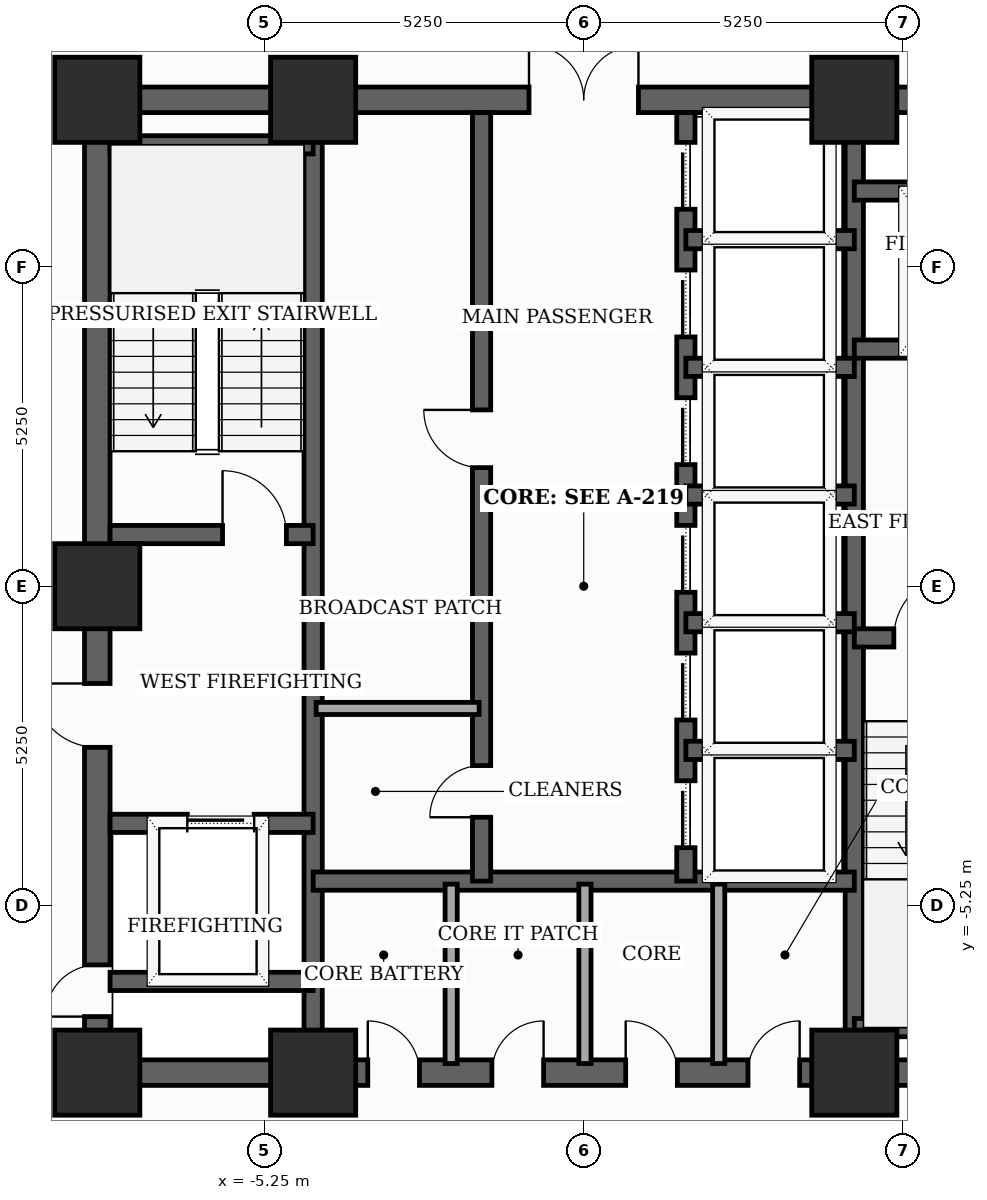
"""IFC4 building model, lengths in metres.
Left out: names, types, materials, properties, quantities, classifications, styles, units other than length and angle.
Written with IfcOpenShell. Run it as: python <this file> out.ifc"""

import sys

from ifc_helpers import new_model, si_unit, direction, frame, frame_2d, origin, origin_2d, place, context, subcontext, project, spatial, rectangle, extrude, element, fill, save


model = new_model("IFC4")
c1 = context("Model", 3, precision=1e-05, world=origin(), true_north=direction((0.0, 1.0)))
c2 = subcontext(c1, "Body", "Model", "MODEL_VIEW")
j1 = project(units=[si_unit("LENGTHUNIT", "METRE"), si_unit("PLANEANGLEUNIT", "RADIAN")], contexts=[c1])
p1 = place(None, origin())
s1 = spatial("IfcSite", under=j1, at=p1, CompositionType="ELEMENT")
p2 = place(p1, origin())
s2 = spatial("IfcBuilding", under=s1, at=p2, CompositionType="ELEMENT")
p3 = place(p2, frame((0.0, 0.0, 180.5)))
s3 = spatial("IfcBuildingStorey", under=s2, at=p3, CompositionType="ELEMENT", Elevation=180.5)
for number, where, z_axis, x_axis in (
    (1, (-8.0, -8.0, 0.0), (0.0, 0.0, 1.0), (1.0, 0.0, 0.0)),
    (2, (-4.45, -8.0, 0.0), (0.0, 0.0, 1.0), (1.0, 0.0, 0.0)),
    (3, (4.45, -8.0, 0.0), (0.0, 0.0, 1.0), (1.0, 0.0, 0.0)),
    (4, (4.45, 8.0, 0.0), (0.0, 0.0, 1.0), (1.0, 0.0, 0.0)),
    (5, (-4.45, 8.0, 0.0), (0.0, 0.0, 1.0), (1.0, 0.0, 0.0)),
    (6, (-8.0, 8.0, 0.0), (0.0, 0.0, 1.0), (1.0, 0.0, 0.0)),
    (7, (-8.0, 0.0, 0.0), (0.0, 0.0, 1.0), (1.0, 0.0, 0.0)),
):
    element("IfcColumn", number, at=place(p3, frame(where, z_axis=z_axis, x_axis=x_axis)), inside=s3, PredefinedType="COLUMN", context=c2, shape_type="SweptSolid", body=[
        extrude(rectangle(XDim=1.4, YDim=1.4, at=origin_2d()), origin(), (0.0, 0.0, 1.0), 3.7),
    ])
p4 = place(p3, frame((-8.0, -8.0, 0.0), z_axis=(0.0, 0.0, 1.0), x_axis=(0.0, 1.0, 0.0)))
e8 = element("IfcWall", 8, at=p4, inside=s3, PredefinedType="SHEAR", context=c2, shape_type="SweptSolid", body=[
    extrude(rectangle(XDim=16.0, YDim=0.42, at=frame_2d((8.0, 0.0))), origin(), (0.0, 0.0, 1.0), 3.5),
])
p5 = place(p4, frame((0.922, 0.0, 0.0)))
e9 = element("IfcOpeningElement", 9, at=p5, cuts=e8, PredefinedType="OPENING", context=c2, shape_type="SweptSolid", body=[
    extrude(rectangle(XDim=0.85, YDim=2.02, at=frame_2d((0.425, 1.01))), frame((0.0, 0.22, 0.0), z_axis=(0.0, -1.0, 0.0), x_axis=(1.0, 0.0, 0.0)), (0.0, 0.0, 1.0), 0.44),
])
p6 = place(p4, frame((5.35, 0.0, 0.0)))
e10 = element("IfcOpeningElement", 10, at=p6, cuts=e8, PredefinedType="OPENING", context=c2, shape_type="SweptSolid", body=[
    extrude(rectangle(XDim=1.05, YDim=2.15, at=frame_2d((0.525, 1.075))), frame((0.0, 0.22, 0.0), z_axis=(0.0, -1.0, 0.0), x_axis=(1.0, 0.0, 0.0)), (0.0, 0.0, 1.0), 0.44),
])
p7 = place(p3, frame((-8.0, -8.0, 0.0), z_axis=(0.0, 0.0, 1.0), x_axis=(1.0, 0.0, 0.0)))
e11 = element("IfcWall", 11, at=p7, inside=s3, PredefinedType="SHEAR", context=c2, shape_type="SweptSolid", body=[
    extrude(rectangle(XDim=16.0, YDim=0.42, at=frame_2d((8.0, 0.0))), origin(), (0.0, 0.0, 1.0), 3.5),
])
p8 = place(p7, frame((4.449, 0.0, 0.0)))
e12 = element("IfcOpeningElement", 12, at=p8, cuts=e11, PredefinedType="OPENING", context=c2, shape_type="SweptSolid", body=[
    extrude(rectangle(XDim=0.85, YDim=2.02, at=frame_2d((0.425, 1.01))), frame((0.0, 0.22, 0.0), z_axis=(0.0, -1.0, 0.0), x_axis=(1.0, 0.0, 0.0)), (0.0, 0.0, 1.0), 0.44),
])
p9 = place(p7, frame((6.49, 0.0, 0.0)))
e13 = element("IfcOpeningElement", 13, at=p9, cuts=e11, PredefinedType="OPENING", context=c2, shape_type="SweptSolid", body=[
    extrude(rectangle(XDim=0.85, YDim=2.02, at=frame_2d((0.425, 1.01))), frame((0.0, 0.22, 0.0), z_axis=(0.0, -1.0, 0.0), x_axis=(1.0, 0.0, 0.0)), (0.0, 0.0, 1.0), 0.44),
])
p10 = place(p7, frame((8.69, 0.0, 0.0)))
e14 = element("IfcOpeningElement", 14, at=p10, cuts=e11, PredefinedType="OPENING", context=c2, shape_type="SweptSolid", body=[
    extrude(rectangle(XDim=0.85, YDim=2.02, at=frame_2d((0.425, 1.01))), frame((0.0, 0.22, 0.0), z_axis=(0.0, -1.0, 0.0), x_axis=(1.0, 0.0, 0.0)), (0.0, 0.0, 1.0), 0.44),
])
p11 = place(p7, frame((10.701, 0.0, 0.0)))
e15 = element("IfcOpeningElement", 15, at=p11, cuts=e11, PredefinedType="OPENING", context=c2, shape_type="SweptSolid", body=[
    extrude(rectangle(XDim=0.85, YDim=2.02, at=frame_2d((0.425, 1.01))), frame((0.0, 0.22, 0.0), z_axis=(0.0, -1.0, 0.0), x_axis=(1.0, 0.0, 0.0)), (0.0, 0.0, 1.0), 0.44),
])
p12 = place(p3, frame((-8.0, 8.0, 0.0), z_axis=(0.0, 0.0, 1.0), x_axis=(1.0, 0.0, 0.0)))
e16 = element("IfcWall", 16, at=p12, inside=s3, PredefinedType="SHEAR", context=c2, shape_type="SweptSolid", body=[
    extrude(rectangle(XDim=16.0, YDim=0.42, at=frame_2d((8.0, 0.0))), origin(), (0.0, 0.0, 1.0), 3.5),
])
p13 = place(p12, frame((7.1, 0.0, 0.0)))
e17 = element("IfcOpeningElement", 17, at=p13, cuts=e16, PredefinedType="OPENING", context=c2, shape_type="SweptSolid", body=[
    extrude(rectangle(XDim=1.8, YDim=2.15, at=frame_2d((0.9, 1.075))), frame((0.0, 0.22, 0.0), z_axis=(0.0, -1.0, 0.0), x_axis=(1.0, 0.0, 0.0)), (0.0, 0.0, 1.0), 0.44),
])
for number, where, z_axis, x_axis in (
    (18, (-4.45, -7.79, 0.0), (0.0, 0.0, 1.0), (0.0, 1.0, 0.0)),
    (19, (4.45, -7.79, 0.0), (0.0, 0.0, 1.0), (0.0, 1.0, 0.0)),
):
    element("IfcWall", number, at=place(p3, frame(where, z_axis=z_axis, x_axis=x_axis)), inside=s3, PredefinedType="SHEAR", context=c2, shape_type="SweptSolid", body=[
        extrude(rectangle(XDim=15.58, YDim=0.3, at=frame_2d((7.79, 0.0))), origin(), (0.0, 0.0, 1.0), 3.5),
    ])
p14 = place(p3, frame((-7.79, 0.85, 0.0), z_axis=(0.0, 0.0, 1.0), x_axis=(1.0, 0.0, 0.0)))
e20 = element("IfcWall", 20, at=p14, inside=s3, PredefinedType="SHEAR", context=c2, shape_type="SweptSolid", body=[
    extrude(rectangle(XDim=3.34, YDim=0.3, at=frame_2d((1.67, 0.0))), origin(), (0.0, 0.0, 1.0), 3.5),
])
p15 = place(p14, frame((1.85, 0.0, 0.0)))
e21 = element("IfcOpeningElement", 21, at=p15, cuts=e20, PredefinedType="OPENING", context=c2, shape_type="SweptSolid", body=[
    extrude(rectangle(XDim=1.05, YDim=2.15, at=frame_2d((0.525, 1.075))), frame((0.0, 0.16, 0.0), z_axis=(0.0, -1.0, 0.0), x_axis=(1.0, 0.0, 0.0)), (0.0, 0.0, 1.0), 0.32),
])
p16 = place(p3, frame((-7.79, 7.26, 0.0), z_axis=(0.0, 0.0, 1.0), x_axis=(1.0, 0.0, 0.0)))
e22 = element("IfcWall", 22, at=p16, inside=s3, PredefinedType="SHEAR", context=c2, shape_type="SweptSolid", body=[
    extrude(rectangle(XDim=3.34, YDim=0.3, at=frame_2d((1.67, 0.0))), origin(), (0.0, 0.0, 1.0), 3.5),
])
p17 = place(p3, frame((4.45, -0.85, 0.0), z_axis=(0.0, 0.0, 1.0), x_axis=(1.0, 0.0, 0.0)))
e23 = element("IfcWall", 23, at=p17, inside=s3, PredefinedType="SHEAR", context=c2, shape_type="SweptSolid", body=[
    extrude(rectangle(XDim=3.34, YDim=0.3, at=frame_2d((1.67, 0.0))), origin(), (0.0, 0.0, 1.0), 3.5),
])
p18 = place(p17, frame((0.65, 0.0, 0.0)))
e24 = element("IfcOpeningElement", 24, at=p18, cuts=e23, PredefinedType="OPENING", context=c2, shape_type="SweptSolid", body=[
    extrude(rectangle(XDim=1.05, YDim=2.15, at=frame_2d((0.525, 1.075))), frame((0.0, 0.16, 0.0), z_axis=(0.0, -1.0, 0.0), x_axis=(1.0, 0.0, 0.0)), (0.0, 0.0, 1.0), 0.32),
])
p19 = place(p3, frame((4.45, -7.26, 0.0), z_axis=(0.0, 0.0, 1.0), x_axis=(1.0, 0.0, 0.0)))
e25 = element("IfcWall", 25, at=p19, inside=s3, PredefinedType="SHEAR", context=c2, shape_type="SweptSolid", body=[
    extrude(rectangle(XDim=3.55, YDim=0.3, at=frame_2d((1.775, 0.0))), origin(), (0.0, 0.0, 1.0), 3.5),
])
p20 = place(p3, frame((-7.79, -3.9, 0.0), z_axis=(0.0, 0.0, 1.0), x_axis=(1.0, 0.0, 0.0)))
e26 = element("IfcWall", 26, at=p20, inside=s3, PredefinedType="SHEAR", context=c2, shape_type="SweptSolid", body=[
    extrude(rectangle(XDim=3.34, YDim=0.3, at=frame_2d((1.67, 0.0))), origin(), (0.0, 0.0, 1.0), 3.5),
])
p21 = place(p20, frame((1.27, 0.0, 0.0)))
e27 = element("IfcOpeningElement", 27, at=p21, cuts=e26, PredefinedType="OPENING", context=c2, shape_type="SweptSolid", body=[
    extrude(rectangle(XDim=1.1, YDim=2.1, at=frame_2d((0.55, 1.05))), frame((0.0, 0.16, 0.0), z_axis=(0.0, -1.0, 0.0), x_axis=(1.0, 0.0, 0.0)), (0.0, 0.0, 1.0), 0.32),
])
p22 = place(p3, frame((-7.79, -6.5, 0.0), z_axis=(0.0, 0.0, 1.0), x_axis=(1.0, 0.0, 0.0)))
e28 = element("IfcWall", 28, at=p22, inside=s3, PredefinedType="SHEAR", context=c2, shape_type="SweptSolid", body=[
    extrude(rectangle(XDim=3.34, YDim=0.3, at=frame_2d((1.67, 0.0))), origin(), (0.0, 0.0, 1.0), 3.5),
])
p23 = place(p3, frame((4.45, 3.9, 0.0), z_axis=(0.0, 0.0, 1.0), x_axis=(1.0, 0.0, 0.0)))
e29 = element("IfcWall", 29, at=p23, inside=s3, PredefinedType="SHEAR", context=c2, shape_type="SweptSolid", body=[
    extrude(rectangle(XDim=3.34, YDim=0.3, at=frame_2d((1.67, 0.0))), origin(), (0.0, 0.0, 1.0), 3.5),
])
p24 = place(p23, frame((1.18, 0.0, 0.0)))
e30 = element("IfcOpeningElement", 30, at=p24, cuts=e29, PredefinedType="OPENING", context=c2, shape_type="SweptSolid", body=[
    extrude(rectangle(XDim=1.1, YDim=2.1, at=frame_2d((0.55, 1.05))), frame((0.0, 0.16, 0.0), z_axis=(0.0, -1.0, 0.0), x_axis=(1.0, 0.0, 0.0)), (0.0, 0.0, 1.0), 0.32),
])
p25 = place(p3, frame((4.45, 6.5, 0.0), z_axis=(0.0, 0.0, 1.0), x_axis=(1.0, 0.0, 0.0)))
e31 = element("IfcWall", 31, at=p25, inside=s3, PredefinedType="SHEAR", context=c2, shape_type="SweptSolid", body=[
    extrude(rectangle(XDim=3.34, YDim=0.3, at=frame_2d((1.67, 0.0))), origin(), (0.0, 0.0, 1.0), 3.5),
])
p26 = place(p3, frame((-4.45, -4.85, 0.0), z_axis=(0.0, 0.0, 1.0), x_axis=(1.0, 0.0, 0.0)))
e32 = element("IfcWall", 32, at=p26, inside=s3, PredefinedType="SHEAR", context=c2, shape_type="SweptSolid", body=[
    extrude(rectangle(XDim=8.9, YDim=0.3, at=frame_2d((4.45, 0.0))), origin(), (0.0, 0.0, 1.0), 3.5),
])
p27 = place(p3, frame((-1.68, -4.85, 0.0), z_axis=(0.0, 0.0, 1.0), x_axis=(0.0, 1.0, 0.0)))
e33 = element("IfcWall", 33, at=p27, inside=s3, PredefinedType="SHEAR", context=c2, shape_type="SweptSolid", body=[
    extrude(rectangle(XDim=12.64, YDim=0.3, at=frame_2d((6.32, 0.0))), origin(), (0.0, 0.0, 1.0), 3.5),
])
p28 = place(p27, frame((1.05, 0.0, 0.0)))
e34 = element("IfcOpeningElement", 34, at=p28, cuts=e33, PredefinedType="OPENING", context=c2, shape_type="SweptSolid", body=[
    extrude(rectangle(XDim=0.85, YDim=2.02, at=frame_2d((0.425, 1.01))), frame((0.0, 0.16, 0.0), z_axis=(0.0, -1.0, 0.0), x_axis=(1.0, 0.0, 0.0)), (0.0, 0.0, 1.0), 0.32),
])
p29 = place(p27, frame((6.8, 0.0, 0.0)))
e35 = element("IfcOpeningElement", 35, at=p29, cuts=e33, PredefinedType="OPENING", context=c2, shape_type="SweptSolid", body=[
    extrude(rectangle(XDim=0.95, YDim=2.1, at=frame_2d((0.475, 1.05))), frame((0.0, 0.16, 0.0), z_axis=(0.0, -1.0, 0.0), x_axis=(1.0, 0.0, 0.0)), (0.0, 0.0, 1.0), 0.32),
])
p30 = place(p3, frame((1.68, -4.85, 0.0), z_axis=(0.0, 0.0, 1.0), x_axis=(0.0, 1.0, 0.0)))
e36 = element("IfcWall", 36, at=p30, inside=s3, PredefinedType="SHEAR", context=c2, shape_type="SweptSolid", body=[
    extrude(rectangle(XDim=12.64, YDim=0.3, at=frame_2d((6.32, 0.0))), origin(), (0.0, 0.0, 1.0), 3.5),
])
p31 = place(p30, frame((0.55, 0.0, 0.0)))
e37 = element("IfcOpeningElement", 37, at=p31, cuts=e36, PredefinedType="OPENING", context=c2, shape_type="SweptSolid", body=[
    extrude(rectangle(XDim=1.1, YDim=2.1, at=frame_2d((0.55, 1.05))), frame((0.0, 0.16, 0.0), z_axis=(0.0, -1.0, 0.0), x_axis=(1.0, 0.0, 0.0)), (0.0, 0.0, 1.0), 0.32),
])
p32 = place(p30, frame((2.65, 0.0, 0.0)))
e38 = element("IfcOpeningElement", 38, at=p32, cuts=e36, PredefinedType="OPENING", context=c2, shape_type="SweptSolid", body=[
    extrude(rectangle(XDim=1.1, YDim=2.1, at=frame_2d((0.55, 1.05))), frame((0.0, 0.16, 0.0), z_axis=(0.0, -1.0, 0.0), x_axis=(1.0, 0.0, 0.0)), (0.0, 0.0, 1.0), 0.32),
])
p33 = place(p30, frame((4.75, 0.0, 0.0)))
e39 = element("IfcOpeningElement", 39, at=p33, cuts=e36, PredefinedType="OPENING", context=c2, shape_type="SweptSolid", body=[
    extrude(rectangle(XDim=1.1, YDim=2.1, at=frame_2d((0.55, 1.05))), frame((0.0, 0.16, 0.0), z_axis=(0.0, -1.0, 0.0), x_axis=(1.0, 0.0, 0.0)), (0.0, 0.0, 1.0), 0.32),
])
p34 = place(p30, frame((6.85, 0.0, 0.0)))
e40 = element("IfcOpeningElement", 40, at=p34, cuts=e36, PredefinedType="OPENING", context=c2, shape_type="SweptSolid", body=[
    extrude(rectangle(XDim=1.1, YDim=2.1, at=frame_2d((0.55, 1.05))), frame((0.0, 0.16, 0.0), z_axis=(0.0, -1.0, 0.0), x_axis=(1.0, 0.0, 0.0)), (0.0, 0.0, 1.0), 0.32),
])
p35 = place(p30, frame((8.95, 0.0, 0.0)))
e41 = element("IfcOpeningElement", 41, at=p35, cuts=e36, PredefinedType="OPENING", context=c2, shape_type="SweptSolid", body=[
    extrude(rectangle(XDim=1.1, YDim=2.1, at=frame_2d((0.55, 1.05))), frame((0.0, 0.16, 0.0), z_axis=(0.0, -1.0, 0.0), x_axis=(1.0, 0.0, 0.0)), (0.0, 0.0, 1.0), 0.32),
])
p36 = place(p30, frame((11.05, 0.0, 0.0)))
e42 = element("IfcOpeningElement", 42, at=p36, cuts=e36, PredefinedType="OPENING", context=c2, shape_type="SweptSolid", body=[
    extrude(rectangle(XDim=1.1, YDim=2.1, at=frame_2d((0.55, 1.05))), frame((0.0, 0.16, 0.0), z_axis=(0.0, -1.0, 0.0), x_axis=(1.0, 0.0, 0.0)), (0.0, 0.0, 1.0), 0.32),
])
for number, where, z_axis, x_axis in (
    (43, (1.68, 1.5, 0.0), (0.0, 0.0, 1.0), (1.0, 0.0, 0.0)),
    (44, (1.68, 3.6, 0.0), (0.0, 0.0, 1.0), (1.0, 0.0, 0.0)),
    (45, (1.68, 5.7, 0.0), (0.0, 0.0, 1.0), (1.0, 0.0, 0.0)),
    (46, (1.68, -2.7, 0.0), (0.0, 0.0, 1.0), (1.0, 0.0, 0.0)),
    (47, (1.68, -0.6, 0.0), (0.0, 0.0, 1.0), (1.0, 0.0, 0.0)),
):
    element("IfcWall", number, at=place(p3, frame(where, z_axis=z_axis, x_axis=x_axis)), inside=s3, PredefinedType="SHEAR", context=c2, shape_type="SweptSolid", body=[
        extrude(rectangle(XDim=2.77, YDim=0.3, at=frame_2d((1.385, 0.0))), origin(), (0.0, 0.0, 1.0), 3.5),
    ])
for number, where, z_axis, x_axis in (
    (48, (-2.18, -7.85, 0.0), (0.0, 0.0, 1.0), (0.0, 1.0, 0.0)),
    (49, (0.02, -7.85, 0.0), (0.0, 0.0, 1.0), (0.0, 1.0, 0.0)),
    (50, (2.22, -7.85, 0.0), (0.0, 0.0, 1.0), (0.0, 1.0, 0.0)),
):
    element("IfcWall", number, at=place(p3, frame(where, z_axis=z_axis, x_axis=x_axis)), inside=s3, PredefinedType="SOLIDWALL", context=c2, shape_type="SweptSolid", body=[
        extrude(rectangle(XDim=2.95, YDim=0.2, at=frame_2d((1.475, 0.0))), origin(), (0.0, 0.0, 1.0), 2.885),
    ])
p37 = place(p3, frame((-4.4, -2.01, 0.0), z_axis=(0.0, 0.0, 1.0), x_axis=(1.0, 0.0, 0.0)))
e51 = element("IfcWall", 51, at=p37, inside=s3, PredefinedType="SOLIDWALL", context=c2, shape_type="SweptSolid", body=[
    extrude(rectangle(XDim=2.68, YDim=0.2, at=frame_2d((1.34, 0.0))), origin(), (0.0, 0.0, 1.0), 3.5),
])
p38 = place(p5, origin())
e52 = element("IfcDoor", 52, at=p38, inside=s3, OperationType="SINGLE_SWING_LEFT", PredefinedType="TRAPDOOR", context=c2, shape_type="SweptSolid", body=[
    extrude(rectangle(XDim=0.85, YDim=2.02, at=frame_2d((0.425, 1.01))), frame((0.0, 0.025, 0.0), z_axis=(0.0, -1.0, 0.0), x_axis=(1.0, 0.0, 0.0)), (0.0, 0.0, 1.0), 0.05),
])
fill(e9, e52)
p39 = place(p6, origin())
e53 = element("IfcDoor", 53, at=p39, inside=s3, OperationType="SINGLE_SWING_RIGHT", PredefinedType="DOOR", context=c2, shape_type="SweptSolid", body=[
    extrude(rectangle(XDim=1.05, YDim=2.15, at=frame_2d((0.525, 1.075))), frame((0.0, 0.025, 0.0), z_axis=(0.0, -1.0, 0.0), x_axis=(1.0, 0.0, 0.0)), (0.0, 0.0, 1.0), 0.05),
])
fill(e10, e53)
p40 = place(p8, origin())
e54 = element("IfcDoor", 54, at=p40, inside=s3, OperationType="SINGLE_SWING_LEFT", PredefinedType="TRAPDOOR", context=c2, shape_type="SweptSolid", body=[
    extrude(rectangle(XDim=0.85, YDim=2.02, at=frame_2d((0.425, 1.01))), frame((0.0, 0.025, 0.0), z_axis=(0.0, -1.0, 0.0), x_axis=(1.0, 0.0, 0.0)), (0.0, 0.0, 1.0), 0.05),
])
fill(e12, e54)
p41 = place(p9, origin())
e55 = element("IfcDoor", 55, at=p41, inside=s3, OperationType="SINGLE_SWING_RIGHT", PredefinedType="TRAPDOOR", context=c2, shape_type="SweptSolid", body=[
    extrude(rectangle(XDim=0.85, YDim=2.02, at=frame_2d((0.425, 1.01))), frame((0.0, 0.025, 0.0), z_axis=(0.0, -1.0, 0.0), x_axis=(1.0, 0.0, 0.0)), (0.0, 0.0, 1.0), 0.05),
])
fill(e13, e55)
p42 = place(p10, origin())
e56 = element("IfcDoor", 56, at=p42, inside=s3, OperationType="SINGLE_SWING_LEFT", PredefinedType="TRAPDOOR", context=c2, shape_type="SweptSolid", body=[
    extrude(rectangle(XDim=0.85, YDim=2.02, at=frame_2d((0.425, 1.01))), frame((0.0, 0.025, 0.0), z_axis=(0.0, -1.0, 0.0), x_axis=(1.0, 0.0, 0.0)), (0.0, 0.0, 1.0), 0.05),
])
fill(e14, e56)
p43 = place(p11, origin())
e57 = element("IfcDoor", 57, at=p43, inside=s3, OperationType="SINGLE_SWING_RIGHT", PredefinedType="TRAPDOOR", context=c2, shape_type="SweptSolid", body=[
    extrude(rectangle(XDim=0.85, YDim=2.02, at=frame_2d((0.425, 1.01))), frame((0.0, 0.025, 0.0), z_axis=(0.0, -1.0, 0.0), x_axis=(1.0, 0.0, 0.0)), (0.0, 0.0, 1.0), 0.05),
])
fill(e15, e57)
p44 = place(p13, origin())
e58 = element("IfcDoor", 58, at=p44, inside=s3, OperationType="DOUBLE_DOOR_SINGLE_SWING", PredefinedType="DOOR", context=c2, shape_type="SweptSolid", body=[
    extrude(rectangle(XDim=1.8, YDim=2.15, at=frame_2d((0.9, 1.075))), frame((0.0, 0.025, 0.0), z_axis=(0.0, -1.0, 0.0), x_axis=(1.0, 0.0, 0.0)), (0.0, 0.0, 1.0), 0.05),
])
fill(e17, e58)
p45 = place(p15, origin())
e59 = element("IfcDoor", 59, at=p45, inside=s3, OperationType="SINGLE_SWING_LEFT", PredefinedType="DOOR", context=c2, shape_type="SweptSolid", body=[
    extrude(rectangle(XDim=1.05, YDim=2.15, at=frame_2d((0.525, 1.075))), frame((0.0, 0.025, 0.0), z_axis=(0.0, -1.0, 0.0), x_axis=(1.0, 0.0, 0.0)), (0.0, 0.0, 1.0), 0.05),
])
fill(e21, e59)
p46 = place(p18, origin())
e60 = element("IfcDoor", 60, at=p46, inside=s3, OperationType="SINGLE_SWING_RIGHT", PredefinedType="DOOR", context=c2, shape_type="SweptSolid", body=[
    extrude(rectangle(XDim=1.05, YDim=2.15, at=frame_2d((0.525, 1.075))), frame((0.0, 0.025, 0.0), z_axis=(0.0, -1.0, 0.0), x_axis=(1.0, 0.0, 0.0)), (0.0, 0.0, 1.0), 0.05),
])
fill(e24, e60)
p47 = place(p21, origin())
e61 = element("IfcDoor", 61, at=p47, inside=s3, OperationType="SLIDING_TO_LEFT", PredefinedType="DOOR", context=c2, shape_type="SweptSolid", body=[
    extrude(rectangle(XDim=1.1, YDim=2.1, at=frame_2d((0.55, 1.05))), frame((0.0, 0.025, 0.0), z_axis=(0.0, -1.0, 0.0), x_axis=(1.0, 0.0, 0.0)), (0.0, 0.0, 1.0), 0.05),
])
fill(e27, e61)
p48 = place(p28, origin())
e62 = element("IfcDoor", 62, at=p48, inside=s3, OperationType="SINGLE_SWING_LEFT", PredefinedType="TRAPDOOR", context=c2, shape_type="SweptSolid", body=[
    extrude(rectangle(XDim=0.85, YDim=2.02, at=frame_2d((0.425, 1.01))), frame((0.0, 0.025, 0.0), z_axis=(0.0, -1.0, 0.0), x_axis=(1.0, 0.0, 0.0)), (0.0, 0.0, 1.0), 0.05),
])
fill(e34, e62)
p49 = place(p29, origin())
e63 = element("IfcDoor", 63, at=p49, inside=s3, OperationType="SINGLE_SWING_RIGHT", PredefinedType="DOOR", context=c2, shape_type="SweptSolid", body=[
    extrude(rectangle(XDim=0.95, YDim=2.1, at=frame_2d((0.475, 1.05))), frame((0.0, 0.025, 0.0), z_axis=(0.0, -1.0, 0.0), x_axis=(1.0, 0.0, 0.0)), (0.0, 0.0, 1.0), 0.05),
])
fill(e35, e63)
p50 = place(p31, origin())
e64 = element("IfcDoor", 64, at=p50, inside=s3, OperationType="SLIDING_TO_LEFT", PredefinedType="DOOR", context=c2, shape_type="SweptSolid", body=[
    extrude(rectangle(XDim=1.1, YDim=2.1, at=frame_2d((0.55, 1.05))), frame((0.0, 0.025, 0.0), z_axis=(0.0, -1.0, 0.0), x_axis=(1.0, 0.0, 0.0)), (0.0, 0.0, 1.0), 0.05),
])
fill(e37, e64)
p51 = place(p32, origin())
e65 = element("IfcDoor", 65, at=p51, inside=s3, OperationType="SLIDING_TO_LEFT", PredefinedType="DOOR", context=c2, shape_type="SweptSolid", body=[
    extrude(rectangle(XDim=1.1, YDim=2.1, at=frame_2d((0.55, 1.05))), frame((0.0, 0.025, 0.0), z_axis=(0.0, -1.0, 0.0), x_axis=(1.0, 0.0, 0.0)), (0.0, 0.0, 1.0), 0.05),
])
fill(e38, e65)
p52 = place(p33, origin())
e66 = element("IfcDoor", 66, at=p52, inside=s3, OperationType="SLIDING_TO_LEFT", PredefinedType="DOOR", context=c2, shape_type="SweptSolid", body=[
    extrude(rectangle(XDim=1.1, YDim=2.1, at=frame_2d((0.55, 1.05))), frame((0.0, 0.025, 0.0), z_axis=(0.0, -1.0, 0.0), x_axis=(1.0, 0.0, 0.0)), (0.0, 0.0, 1.0), 0.05),
])
fill(e39, e66)
p53 = place(p34, origin())
e67 = element("IfcDoor", 67, at=p53, inside=s3, OperationType="SLIDING_TO_LEFT", PredefinedType="DOOR", context=c2, shape_type="SweptSolid", body=[
    extrude(rectangle(XDim=1.1, YDim=2.1, at=frame_2d((0.55, 1.05))), frame((0.0, 0.025, 0.0), z_axis=(0.0, -1.0, 0.0), x_axis=(1.0, 0.0, 0.0)), (0.0, 0.0, 1.0), 0.05),
])
fill(e40, e67)
p54 = place(p35, origin())
e68 = element("IfcDoor", 68, at=p54, inside=s3, OperationType="SLIDING_TO_LEFT", PredefinedType="DOOR", context=c2, shape_type="SweptSolid", body=[
    extrude(rectangle(XDim=1.1, YDim=2.1, at=frame_2d((0.55, 1.05))), frame((0.0, 0.025, 0.0), z_axis=(0.0, -1.0, 0.0), x_axis=(1.0, 0.0, 0.0)), (0.0, 0.0, 1.0), 0.05),
])
fill(e41, e68)
p55 = place(p36, origin())
e69 = element("IfcDoor", 69, at=p55, inside=s3, OperationType="SLIDING_TO_LEFT", PredefinedType="DOOR", context=c2, shape_type="SweptSolid", body=[
    extrude(rectangle(XDim=1.1, YDim=2.1, at=frame_2d((0.55, 1.05))), frame((0.0, 0.025, 0.0), z_axis=(0.0, -1.0, 0.0), x_axis=(1.0, 0.0, 0.0)), (0.0, 0.0, 1.0), 0.05),
])
fill(e42, e69)
save(model, sys.argv[1])
